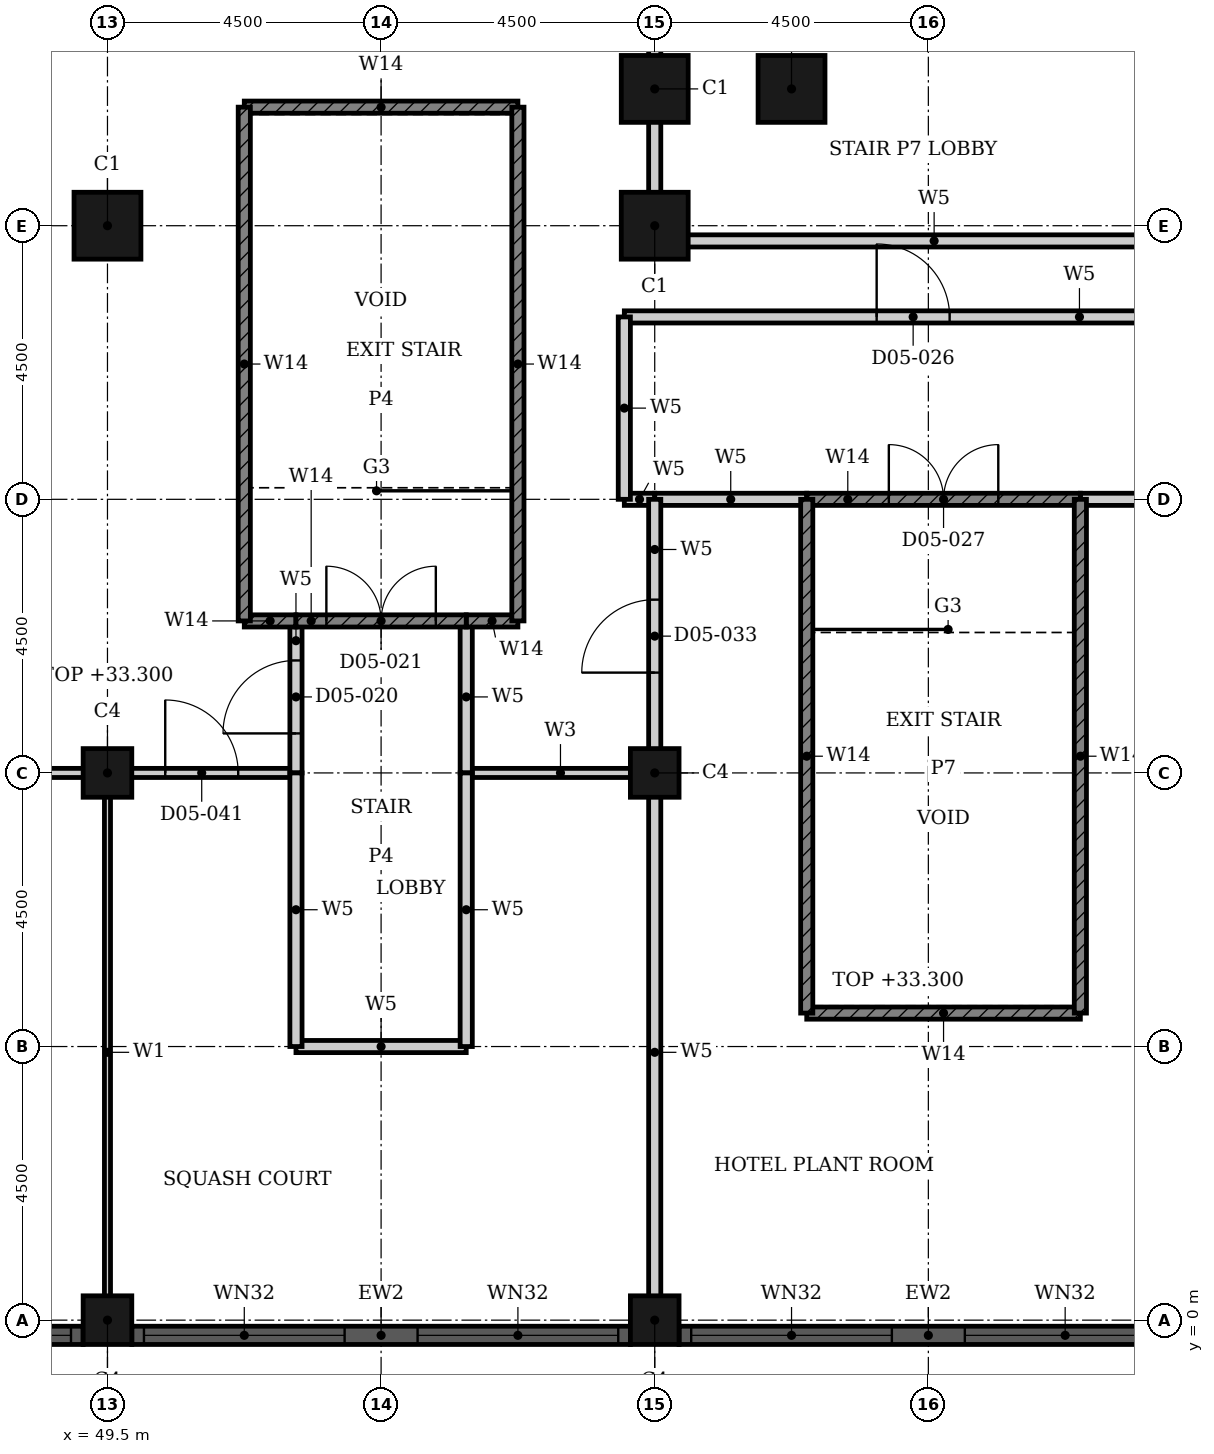
"""IFC4 building model, lengths in metres.
Left out: names, types, materials, properties, quantities, classifications, styles, units other than length and angle.
Written with IfcOpenShell. Run it as: python <this file> out.ifc"""

import sys

from ifc_helpers import new_model, si_unit, direction, frame, frame_2d, origin, origin_2d, place, context, subcontext, project, spatial, rectangle, hollow_rectangle, extrude, element, fill, save


model = new_model("IFC4")
c1 = context("Model", 3, precision=1e-05, world=origin(), true_north=direction((0.0, 1.0)))
c2 = subcontext(c1, "Body", "Model", "MODEL_VIEW")
j1 = project(units=[si_unit("LENGTHUNIT", "METRE"), si_unit("PLANEANGLEUNIT", "RADIAN")], contexts=[c1])
p1 = place(None, origin())
s1 = spatial("IfcSite", under=j1, at=p1, CompositionType="ELEMENT")
p2 = place(p1, origin())
s2 = spatial("IfcBuilding", under=s1, at=p2, CompositionType="ELEMENT")
p3 = place(p2, frame((0.0, 0.0, 28.8)))
s3 = spatial("IfcBuildingStorey", under=s2, at=p3, CompositionType="ELEMENT", Elevation=28.8)
for number, where, z_axis, x_axis in (
    (1, (49.5, 18.0, 0.0), (0.0, 0.0, 1.0), (1.0, 0.0, 0.0)),
    (2, (58.5, 18.0, 0.0), (0.0, 0.0, 1.0), (1.0, 0.0, 0.0)),
    (3, (58.5, 20.25, 0.0), (0.0, 0.0, 1.0), (1.0, 0.0, 0.0)),
    (4, (60.75, 20.25, 0.0), (0.0, 0.0, 1.0), (1.0, 0.0, 0.0)),
):
    element("IfcColumn", number, at=place(p3, frame(where, z_axis=z_axis, x_axis=x_axis)), inside=s3, PredefinedType="COLUMN", context=c2, shape_type="SweptSolid", body=[
        extrude(hollow_rectangle(XDim=1.1, YDim=1.1, WallThickness=0.036, at=origin_2d()), origin(), (0.0, 0.0, 1.0), 4.8),
    ])
for number, where, z_axis, x_axis in (
    (5, (49.5, 0.0, 0.0), (0.0, 0.0, 1.0), (1.0, 0.0, 0.0)),
    (6, (58.5, 0.0, 0.0), (0.0, 0.0, 1.0), (1.0, 0.0, 0.0)),
    (7, (49.5, 9.0, 0.0), (0.0, 0.0, 1.0), (1.0, 0.0, 0.0)),
    (8, (58.5, 9.0, 0.0), (0.0, 0.0, 1.0), (1.0, 0.0, 0.0)),
):
    element("IfcColumn", number, at=place(p3, frame(where, z_axis=z_axis, x_axis=x_axis)), inside=s3, PredefinedType="COLUMN", context=c2, shape_type="SweptSolid", body=[
        extrude(hollow_rectangle(XDim=0.8, YDim=0.8, WallThickness=0.025, at=origin_2d()), origin(), (0.0, 0.0, 1.0), 4.5),
    ])
p4 = place(p3, frame((40.9, -0.25, 0.0), z_axis=(0.0, 0.0, 1.0), x_axis=(1.0, 0.0, 0.0)))
e9 = element("IfcWall", 9, at=p4, inside=s3, PredefinedType="SOLIDWALL", context=c2, shape_type="SweptSolid", body=[
    extrude(rectangle(XDim=8.2, YDim=0.3, at=frame_2d((4.1, 0.0))), origin(), (0.0, 0.0, 1.0), 4.8),
])
p5 = place(p4, frame((0.2, 0.0, 0.9)))
e10 = element("IfcOpeningElement", 10, at=p5, cuts=e9, PredefinedType="OPENING", context=c2, shape_type="SweptSolid", body=[
    extrude(rectangle(XDim=3.3, YDim=2.9, at=frame_2d((1.65, 1.45))), frame((0.0, 0.16, 0.0), z_axis=(0.0, -1.0, 0.0), x_axis=(1.0, 0.0, 0.0)), (0.0, 0.0, 1.0), 0.32),
])
p6 = place(p4, frame((4.7, 0.0, 0.9)))
e11 = element("IfcOpeningElement", 11, at=p6, cuts=e9, PredefinedType="OPENING", context=c2, shape_type="SweptSolid", body=[
    extrude(rectangle(XDim=3.3, YDim=2.9, at=frame_2d((1.65, 1.45))), frame((0.0, 0.16, 0.0), z_axis=(0.0, -1.0, 0.0), x_axis=(1.0, 0.0, 0.0)), (0.0, 0.0, 1.0), 0.32),
])
p7 = place(p3, frame((49.9, -0.25, 0.0), z_axis=(0.0, 0.0, 1.0), x_axis=(1.0, 0.0, 0.0)))
e12 = element("IfcWall", 12, at=p7, inside=s3, PredefinedType="SOLIDWALL", context=c2, shape_type="SweptSolid", body=[
    extrude(rectangle(XDim=8.2, YDim=0.3, at=frame_2d((4.1, 0.0))), origin(), (0.0, 0.0, 1.0), 4.8),
])
p8 = place(p7, frame((0.2, 0.0, 0.9)))
e13 = element("IfcOpeningElement", 13, at=p8, cuts=e12, PredefinedType="OPENING", context=c2, shape_type="SweptSolid", body=[
    extrude(rectangle(XDim=3.3, YDim=2.9, at=frame_2d((1.65, 1.45))), frame((0.0, 0.16, 0.0), z_axis=(0.0, -1.0, 0.0), x_axis=(1.0, 0.0, 0.0)), (0.0, 0.0, 1.0), 0.32),
])
p9 = place(p7, frame((4.7, 0.0, 0.9)))
e14 = element("IfcOpeningElement", 14, at=p9, cuts=e12, PredefinedType="OPENING", context=c2, shape_type="SweptSolid", body=[
    extrude(rectangle(XDim=3.3, YDim=2.9, at=frame_2d((1.65, 1.45))), frame((0.0, 0.16, 0.0), z_axis=(0.0, -1.0, 0.0), x_axis=(1.0, 0.0, 0.0)), (0.0, 0.0, 1.0), 0.32),
])
p10 = place(p3, frame((58.9, -0.25, 0.0), z_axis=(0.0, 0.0, 1.0), x_axis=(1.0, 0.0, 0.0)))
e15 = element("IfcWall", 15, at=p10, inside=s3, PredefinedType="SOLIDWALL", context=c2, shape_type="SweptSolid", body=[
    extrude(rectangle(XDim=8.2, YDim=0.3, at=frame_2d((4.1, 0.0))), origin(), (0.0, 0.0, 1.0), 4.8),
])
p11 = place(p10, frame((0.2, 0.0, 0.9)))
e16 = element("IfcOpeningElement", 16, at=p11, cuts=e15, PredefinedType="OPENING", context=c2, shape_type="SweptSolid", body=[
    extrude(rectangle(XDim=3.3, YDim=2.9, at=frame_2d((1.65, 1.45))), frame((0.0, 0.16, 0.0), z_axis=(0.0, -1.0, 0.0), x_axis=(1.0, 0.0, 0.0)), (0.0, 0.0, 1.0), 0.32),
])
p12 = place(p10, frame((4.7, 0.0, 0.9)))
e17 = element("IfcOpeningElement", 17, at=p12, cuts=e15, PredefinedType="OPENING", context=c2, shape_type="SweptSolid", body=[
    extrude(rectangle(XDim=3.3, YDim=2.9, at=frame_2d((1.65, 1.45))), frame((0.0, 0.16, 0.0), z_axis=(0.0, -1.0, 0.0), x_axis=(1.0, 0.0, 0.0)), (0.0, 0.0, 1.0), 0.32),
])
p13 = place(p3, frame((38.25, 9.0, 0.0), z_axis=(0.0, 0.0, 1.0), x_axis=(1.0, 0.0, 0.0)))
e18 = element("IfcWall", 18, at=p13, inside=s3, PredefinedType="PARTITIONING", context=c2, shape_type="SweptSolid", body=[
    extrude(rectangle(XDim=11.25, YDim=0.15, at=frame_2d((5.625, 0.0))), origin(), (0.0, 0.0, 1.0), 4.5),
])
p14 = place(p13, frame((5.025, 0.0, 0.0)))
e19 = element("IfcOpeningElement", 19, at=p14, cuts=e18, PredefinedType="OPENING", context=c2, shape_type="SweptSolid", body=[
    extrude(rectangle(XDim=1.2, YDim=2.4, at=frame_2d((0.6, 1.2))), frame((0.0, 0.085, 0.0), z_axis=(0.0, -1.0, 0.0), x_axis=(1.0, 0.0, 0.0)), (0.0, 0.0, 1.0), 0.17),
])
p15 = place(p3, frame((49.5, 9.0, 0.0), z_axis=(0.0, 0.0, 1.0), x_axis=(1.0, 0.0, 0.0)))
e20 = element("IfcWall", 20, at=p15, inside=s3, PredefinedType="PARTITIONING", context=c2, shape_type="SweptSolid", body=[
    extrude(rectangle(XDim=3.1, YDim=0.15, at=frame_2d((1.55, 0.0))), origin(), (0.0, 0.0, 1.0), 4.5),
])
p16 = place(p15, frame((0.95, 0.0, 0.0)))
e21 = element("IfcOpeningElement", 21, at=p16, cuts=e20, PredefinedType="OPENING", context=c2, shape_type="SweptSolid", body=[
    extrude(rectangle(XDim=1.2, YDim=2.4, at=frame_2d((0.6, 1.2))), frame((0.0, 0.085, 0.0), z_axis=(0.0, -1.0, 0.0), x_axis=(1.0, 0.0, 0.0)), (0.0, 0.0, 1.0), 0.17),
])
p17 = place(p3, frame((55.4, 9.0, 0.0), z_axis=(0.0, 0.0, 1.0), x_axis=(1.0, 0.0, 0.0)))
e22 = element("IfcWall", 22, at=p17, inside=s3, PredefinedType="PARTITIONING", context=c2, shape_type="SweptSolid", body=[
    extrude(rectangle(XDim=3.1, YDim=0.15, at=frame_2d((1.55, 0.0))), origin(), (0.0, 0.0, 1.0), 4.5),
])
p18 = place(p3, frame((49.5, -0.19, 0.0), z_axis=(0.0, 0.0, 1.0), x_axis=(0.0, 1.0, 0.0)))
e23 = element("IfcWall", 23, at=p18, inside=s3, PredefinedType="PARTITIONING", context=c2, shape_type="SweptSolid", body=[
    extrude(rectangle(XDim=9.19, YDim=0.1, at=frame_2d((4.595, 0.0))), origin(), (0.0, 0.0, 1.0), 4.5),
])
p19 = place(p3, frame((58.0, 13.5, 0.0), z_axis=(0.0, 0.0, 1.0), x_axis=(1.0, 0.0, 0.0)))
e24 = element("IfcWall", 24, at=p19, inside=s3, PredefinedType="PARTITIONING", context=c2, shape_type="SweptSolid", body=[
    extrude(rectangle(XDim=0.5, YDim=0.2, at=frame_2d((0.25, 0.0))), origin(), (0.0, 0.0, 1.0), 4.5),
])
p20 = place(p3, frame((58.5, 13.5, 0.0), z_axis=(0.0, 0.0, 1.0), x_axis=(1.0, 0.0, 0.0)))
e25 = element("IfcWall", 25, at=p20, inside=s3, PredefinedType="PARTITIONING", context=c2, shape_type="SweptSolid", body=[
    extrude(rectangle(XDim=2.5, YDim=0.2, at=frame_2d((1.25, 0.0))), origin(), (0.0, 0.0, 1.0), 4.5),
])
p21 = place(p3, frame((65.5, 13.5, 0.0), z_axis=(0.0, 0.0, 1.0), x_axis=(1.0, 0.0, 0.0)))
e26 = element("IfcWall", 26, at=p21, inside=s3, PredefinedType="PARTITIONING", context=c2, shape_type="SweptSolid", body=[
    extrude(rectangle(XDim=2.29, YDim=0.2, at=frame_2d((1.145, 0.0))), origin(), (0.0, 0.0, 1.0), 4.5),
])
p22 = place(p3, frame((58.0, 16.5, 0.0), z_axis=(0.0, 0.0, 1.0), x_axis=(1.0, 0.0, 0.0)))
e27 = element("IfcWall", 27, at=p22, inside=s3, PredefinedType="PARTITIONING", context=c2, shape_type="SweptSolid", body=[
    extrude(rectangle(XDim=9.62, YDim=0.2, at=frame_2d((4.81, 0.0))), origin(), (0.0, 0.0, 1.0), 4.5),
])
p23 = place(p22, frame((4.15, 0.0, 0.0)))
e28 = element("IfcOpeningElement", 28, at=p23, cuts=e27, PredefinedType="OPENING", context=c2, shape_type="SweptSolid", body=[
    extrude(rectangle(XDim=1.2, YDim=2.1, at=frame_2d((0.6, 1.05))), frame((0.0, 0.11, 0.0), z_axis=(0.0, -1.0, 0.0), x_axis=(1.0, 0.0, 0.0)), (0.0, 0.0, 1.0), 0.22),
])
p24 = place(p3, frame((58.5, 17.75, 0.0), z_axis=(0.0, 0.0, 1.0), x_axis=(1.0, 0.0, 0.0)))
e29 = element("IfcWall", 29, at=p24, inside=s3, PredefinedType="PARTITIONING", context=c2, shape_type="SweptSolid", body=[
    extrude(rectangle(XDim=9.19, YDim=0.2, at=frame_2d((4.595, 0.0))), origin(), (0.0, 0.0, 1.0), 4.5),
])
p25 = place(p3, frame((52.6, 4.5, 0.0), z_axis=(0.0, 0.0, 1.0), x_axis=(1.0, 0.0, 0.0)))
e30 = element("IfcWall", 30, at=p25, inside=s3, PredefinedType="PARTITIONING", context=c2, shape_type="SweptSolid", body=[
    extrude(rectangle(XDim=2.8, YDim=0.2, at=frame_2d((1.4, 0.0))), origin(), (0.0, 0.0, 1.0), 4.5),
])
p26 = place(p3, frame((52.6, 9.0, 0.0), z_axis=(0.0, 0.0, 1.0), x_axis=(0.0, 1.0, 0.0)))
e31 = element("IfcWall", 31, at=p26, inside=s3, PredefinedType="PARTITIONING", context=c2, shape_type="SweptSolid", body=[
    extrude(rectangle(XDim=2.5, YDim=0.2, at=frame_2d((1.25, 0.0))), origin(), (0.0, 0.0, 1.0), 4.5),
])
p27 = place(p26, frame((0.65, 0.0, 0.0)))
e32 = element("IfcOpeningElement", 32, at=p27, cuts=e31, PredefinedType="OPENING", context=c2, shape_type="SweptSolid", body=[
    extrude(rectangle(XDim=1.2, YDim=2.1, at=frame_2d((0.6, 1.05))), frame((0.0, 0.11, 0.0), z_axis=(0.0, -1.0, 0.0), x_axis=(1.0, 0.0, 0.0)), (0.0, 0.0, 1.0), 0.22),
])
p28 = place(p3, frame((52.6, 4.5, 0.0), z_axis=(0.0, 0.0, 1.0), x_axis=(0.0, 1.0, 0.0)))
e33 = element("IfcWall", 33, at=p28, inside=s3, PredefinedType="PARTITIONING", context=c2, shape_type="SweptSolid", body=[
    extrude(rectangle(XDim=4.5, YDim=0.2, at=frame_2d((2.25, 0.0))), origin(), (0.0, 0.0, 1.0), 4.5),
])
p29 = place(p3, frame((55.4, 9.0, 0.0), z_axis=(0.0, 0.0, 1.0), x_axis=(0.0, 1.0, 0.0)))
e34 = element("IfcWall", 34, at=p29, inside=s3, PredefinedType="PARTITIONING", context=c2, shape_type="SweptSolid", body=[
    extrude(rectangle(XDim=2.5, YDim=0.2, at=frame_2d((1.25, 0.0))), origin(), (0.0, 0.0, 1.0), 4.5),
])
p30 = place(p3, frame((55.4, 4.5, 0.0), z_axis=(0.0, 0.0, 1.0), x_axis=(0.0, 1.0, 0.0)))
e35 = element("IfcWall", 35, at=p30, inside=s3, PredefinedType="PARTITIONING", context=c2, shape_type="SweptSolid", body=[
    extrude(rectangle(XDim=4.5, YDim=0.2, at=frame_2d((2.25, 0.0))), origin(), (0.0, 0.0, 1.0), 4.5),
])
p31 = place(p3, frame((58.0, 13.5, 0.0), z_axis=(0.0, 0.0, 1.0), x_axis=(0.0, 1.0, 0.0)))
e36 = element("IfcWall", 36, at=p31, inside=s3, PredefinedType="PARTITIONING", context=c2, shape_type="SweptSolid", body=[
    extrude(rectangle(XDim=3.0, YDim=0.2, at=frame_2d((1.5, 0.0))), origin(), (0.0, 0.0, 1.0), 4.5),
])
p32 = place(p3, frame((58.5, 9.0, 0.0), z_axis=(0.0, 0.0, 1.0), x_axis=(0.0, 1.0, 0.0)))
e37 = element("IfcWall", 37, at=p32, inside=s3, PredefinedType="PARTITIONING", context=c2, shape_type="SweptSolid", body=[
    extrude(rectangle(XDim=4.5, YDim=0.2, at=frame_2d((2.25, 0.0))), origin(), (0.0, 0.0, 1.0), 4.5),
])
p33 = place(p32, frame((1.65, 0.0, 0.0)))
e38 = element("IfcOpeningElement", 38, at=p33, cuts=e37, PredefinedType="OPENING", context=c2, shape_type="SweptSolid", body=[
    extrude(rectangle(XDim=1.2, YDim=2.1, at=frame_2d((0.6, 1.05))), frame((0.0, 0.11, 0.0), z_axis=(0.0, -1.0, 0.0), x_axis=(1.0, 0.0, 0.0)), (0.0, 0.0, 1.0), 0.22),
])
p34 = place(p3, frame((58.5, -0.19, 0.0), z_axis=(0.0, 0.0, 1.0), x_axis=(0.0, 1.0, 0.0)))
e39 = element("IfcWall", 39, at=p34, inside=s3, PredefinedType="PARTITIONING", context=c2, shape_type="SweptSolid", body=[
    extrude(rectangle(XDim=9.19, YDim=0.2, at=frame_2d((4.595, 0.0))), origin(), (0.0, 0.0, 1.0), 4.5),
])
p35 = place(p3, frame((58.5, 17.75, 0.0), z_axis=(0.0, 0.0, 1.0), x_axis=(0.0, 1.0, 0.0)))
e40 = element("IfcWall", 40, at=p35, inside=s3, PredefinedType="PARTITIONING", context=c2, shape_type="SweptSolid", body=[
    extrude(rectangle(XDim=11.75, YDim=0.2, at=frame_2d((5.875, 0.0))), origin(), (0.0, 0.0, 1.0), 3.88),
])
p36 = place(p35, frame((5.275, 0.0, 0.0)))
e41 = element("IfcOpeningElement", 41, at=p36, cuts=e40, PredefinedType="OPENING", context=c2, shape_type="SweptSolid", body=[
    extrude(rectangle(XDim=1.2, YDim=2.1, at=frame_2d((0.6, 1.05))), frame((0.0, 0.11, 0.0), z_axis=(0.0, -1.0, 0.0), x_axis=(1.0, 0.0, 0.0)), (0.0, 0.0, 1.0), 0.22),
])
for number, where, z_axis, x_axis in (
    (42, (51.75, 11.5, 0.0), (0.0, 0.0, 1.0), (1.0, 0.0, 0.0)),
    (43, (55.4, 11.5, 0.0), (0.0, 0.0, 1.0), (1.0, 0.0, 0.0)),
):
    element("IfcWall", number, at=place(p3, frame(where, z_axis=z_axis, x_axis=x_axis)), inside=s3, PredefinedType="SHEAR", context=c2, shape_type="SweptSolid", body=[
        extrude(rectangle(XDim=0.85, YDim=0.2, at=frame_2d((0.425, 0.0))), origin(), (0.0, 0.0, 1.0), 4.5),
    ])
p37 = place(p3, frame((52.6, 11.5, 0.0), z_axis=(0.0, 0.0, 1.0), x_axis=(1.0, 0.0, 0.0)))
e44 = element("IfcWall", 44, at=p37, inside=s3, PredefinedType="SHEAR", context=c2, shape_type="SweptSolid", body=[
    extrude(rectangle(XDim=2.8, YDim=0.2, at=frame_2d((1.4, 0.0))), origin(), (0.0, 0.0, 1.0), 4.5),
])
p38 = place(p37, frame((0.5, 0.0, 0.0)))
e45 = element("IfcOpeningElement", 45, at=p38, cuts=e44, PredefinedType="OPENING", context=c2, shape_type="SweptSolid", body=[
    extrude(rectangle(XDim=1.8, YDim=2.1, at=frame_2d((0.9, 1.05))), frame((0.0, 0.11, 0.0), z_axis=(0.0, -1.0, 0.0), x_axis=(1.0, 0.0, 0.0)), (0.0, 0.0, 1.0), 0.22),
])
p39 = place(p3, frame((61.0, 13.5, 0.0), z_axis=(0.0, 0.0, 1.0), x_axis=(1.0, 0.0, 0.0)))
e46 = element("IfcWall", 46, at=p39, inside=s3, PredefinedType="SHEAR", context=c2, shape_type="SweptSolid", body=[
    extrude(rectangle(XDim=4.5, YDim=0.2, at=frame_2d((2.25, 0.0))), origin(), (0.0, 0.0, 1.0), 4.5),
])
p40 = place(p39, frame((1.35, 0.0, 0.0)))
e47 = element("IfcOpeningElement", 47, at=p40, cuts=e46, PredefinedType="OPENING", context=c2, shape_type="SweptSolid", body=[
    extrude(rectangle(XDim=1.8, YDim=2.1, at=frame_2d((0.9, 1.05))), frame((0.0, 0.11, 0.0), z_axis=(0.0, -1.0, 0.0), x_axis=(1.0, 0.0, 0.0)), (0.0, 0.0, 1.0), 0.22),
])
for number, where, z_axis, x_axis in (
    (48, (51.75, 19.95, 0.0), (0.0, 0.0, 1.0), (1.0, 0.0, 0.0)),
    (49, (61.0, 5.05, 0.0), (0.0, 0.0, 1.0), (1.0, 0.0, 0.0)),
):
    element("IfcWall", number, at=place(p3, frame(where, z_axis=z_axis, x_axis=x_axis)), inside=s3, PredefinedType="SHEAR", context=c2, shape_type="SweptSolid", body=[
        extrude(rectangle(XDim=4.5, YDim=0.2, at=frame_2d((2.25, 0.0))), origin(), (0.0, 0.0, 1.0), 4.5),
    ])
for number, where, z_axis, x_axis in (
    (50, (51.75, 11.5, 0.0), (0.0, 0.0, 1.0), (0.0, 1.0, 0.0)),
    (51, (56.25, 11.5, 0.0), (0.0, 0.0, 1.0), (0.0, 1.0, 0.0)),
    (52, (61.0, 5.05, 0.0), (0.0, 0.0, 1.0), (0.0, 1.0, 0.0)),
    (53, (65.5, 5.05, 0.0), (0.0, 0.0, 1.0), (0.0, 1.0, 0.0)),
):
    element("IfcWall", number, at=place(p3, frame(where, z_axis=z_axis, x_axis=x_axis)), inside=s3, PredefinedType="SHEAR", context=c2, shape_type="SweptSolid", body=[
        extrude(rectangle(XDim=8.45, YDim=0.2, at=frame_2d((4.225, 0.0))), origin(), (0.0, 0.0, 1.0), 4.5),
    ])
p41 = place(p6, origin())
e54 = element("IfcWindow", 54, at=p41, inside=s3, PartitioningType="SINGLE_PANEL", PredefinedType="WINDOW", context=c2, shape_type="SweptSolid", body=[
    extrude(rectangle(XDim=3.3, YDim=2.9, at=frame_2d((1.65, 1.45))), frame((0.0, 0.03, 0.0), z_axis=(0.0, -1.0, 0.0), x_axis=(1.0, 0.0, 0.0)), (0.0, 0.0, 1.0), 0.06),
])
fill(e11, e54)
p42 = place(p8, origin())
e55 = element("IfcWindow", 55, at=p42, inside=s3, PartitioningType="SINGLE_PANEL", PredefinedType="WINDOW", context=c2, shape_type="SweptSolid", body=[
    extrude(rectangle(XDim=3.3, YDim=2.9, at=frame_2d((1.65, 1.45))), frame((0.0, 0.03, 0.0), z_axis=(0.0, -1.0, 0.0), x_axis=(1.0, 0.0, 0.0)), (0.0, 0.0, 1.0), 0.06),
])
fill(e13, e55)
p43 = place(p9, origin())
e56 = element("IfcWindow", 56, at=p43, inside=s3, PartitioningType="SINGLE_PANEL", PredefinedType="WINDOW", context=c2, shape_type="SweptSolid", body=[
    extrude(rectangle(XDim=3.3, YDim=2.9, at=frame_2d((1.65, 1.45))), frame((0.0, 0.03, 0.0), z_axis=(0.0, -1.0, 0.0), x_axis=(1.0, 0.0, 0.0)), (0.0, 0.0, 1.0), 0.06),
])
fill(e14, e56)
p44 = place(p11, origin())
e57 = element("IfcWindow", 57, at=p44, inside=s3, PartitioningType="SINGLE_PANEL", PredefinedType="WINDOW", context=c2, shape_type="SweptSolid", body=[
    extrude(rectangle(XDim=3.3, YDim=2.9, at=frame_2d((1.65, 1.45))), frame((0.0, 0.03, 0.0), z_axis=(0.0, -1.0, 0.0), x_axis=(1.0, 0.0, 0.0)), (0.0, 0.0, 1.0), 0.06),
])
fill(e16, e57)
p45 = place(p12, origin())
e58 = element("IfcWindow", 58, at=p45, inside=s3, PartitioningType="SINGLE_PANEL", PredefinedType="WINDOW", context=c2, shape_type="SweptSolid", body=[
    extrude(rectangle(XDim=3.3, YDim=2.9, at=frame_2d((1.65, 1.45))), frame((0.0, 0.03, 0.0), z_axis=(0.0, -1.0, 0.0), x_axis=(1.0, 0.0, 0.0)), (0.0, 0.0, 1.0), 0.06),
])
fill(e17, e58)
p46 = place(p27, origin())
e59 = element("IfcDoor", 59, at=p46, inside=s3, OperationType="SINGLE_SWING_RIGHT", PredefinedType="DOOR", context=c2, shape_type="SweptSolid", body=[
    extrude(rectangle(XDim=1.2, YDim=2.1, at=frame_2d((0.6, 1.05))), frame((0.0, 0.025, 0.0), z_axis=(0.0, -1.0, 0.0), x_axis=(1.0, 0.0, 0.0)), (0.0, 0.0, 1.0), 0.05),
])
fill(e32, e59)
p47 = place(p38, origin())
e60 = element("IfcDoor", 60, at=p47, inside=s3, OperationType="DOUBLE_DOOR_SINGLE_SWING", PredefinedType="DOOR", context=c2, shape_type="SweptSolid", body=[
    extrude(rectangle(XDim=1.8, YDim=2.1, at=frame_2d((0.9, 1.05))), frame((0.0, 0.025, 0.0), z_axis=(0.0, -1.0, 0.0), x_axis=(1.0, 0.0, 0.0)), (0.0, 0.0, 1.0), 0.05),
])
fill(e45, e60)
p48 = place(p23, origin())
e61 = element("IfcDoor", 61, at=p48, inside=s3, OperationType="SINGLE_SWING_LEFT", PredefinedType="DOOR", context=c2, shape_type="SweptSolid", body=[
    extrude(rectangle(XDim=1.2, YDim=2.1, at=frame_2d((0.6, 1.05))), frame((0.0, 0.025, 0.0), z_axis=(0.0, -1.0, 0.0), x_axis=(1.0, 0.0, 0.0)), (0.0, 0.0, 1.0), 0.05),
])
fill(e28, e61)
p49 = place(p40, origin())
e62 = element("IfcDoor", 62, at=p49, inside=s3, OperationType="DOUBLE_DOOR_SINGLE_SWING", PredefinedType="DOOR", context=c2, shape_type="SweptSolid", body=[
    extrude(rectangle(XDim=1.8, YDim=2.1, at=frame_2d((0.9, 1.05))), frame((0.0, 0.025, 0.0), z_axis=(0.0, -1.0, 0.0), x_axis=(1.0, 0.0, 0.0)), (0.0, 0.0, 1.0), 0.05),
])
fill(e47, e62)
p50 = place(p33, origin())
e63 = element("IfcDoor", 63, at=p50, inside=s3, OperationType="SINGLE_SWING_LEFT", PredefinedType="DOOR", context=c2, shape_type="SweptSolid", body=[
    extrude(rectangle(XDim=1.2, YDim=2.1, at=frame_2d((0.6, 1.05))), frame((0.0, 0.025, 0.0), z_axis=(0.0, -1.0, 0.0), x_axis=(1.0, 0.0, 0.0)), (0.0, 0.0, 1.0), 0.05),
])
fill(e38, e63)
p51 = place(p16, origin())
e64 = element("IfcDoor", 64, at=p51, inside=s3, OperationType="SINGLE_SWING_LEFT", PredefinedType="DOOR", context=c2, shape_type="SweptSolid", body=[
    extrude(rectangle(XDim=1.2, YDim=2.4, at=frame_2d((0.6, 1.2))), frame((0.0, 0.025, 0.0), z_axis=(0.0, -1.0, 0.0), x_axis=(1.0, 0.0, 0.0)), (0.0, 0.0, 1.0), 0.05),
])
fill(e21, e64)
save(model, sys.argv[1])
